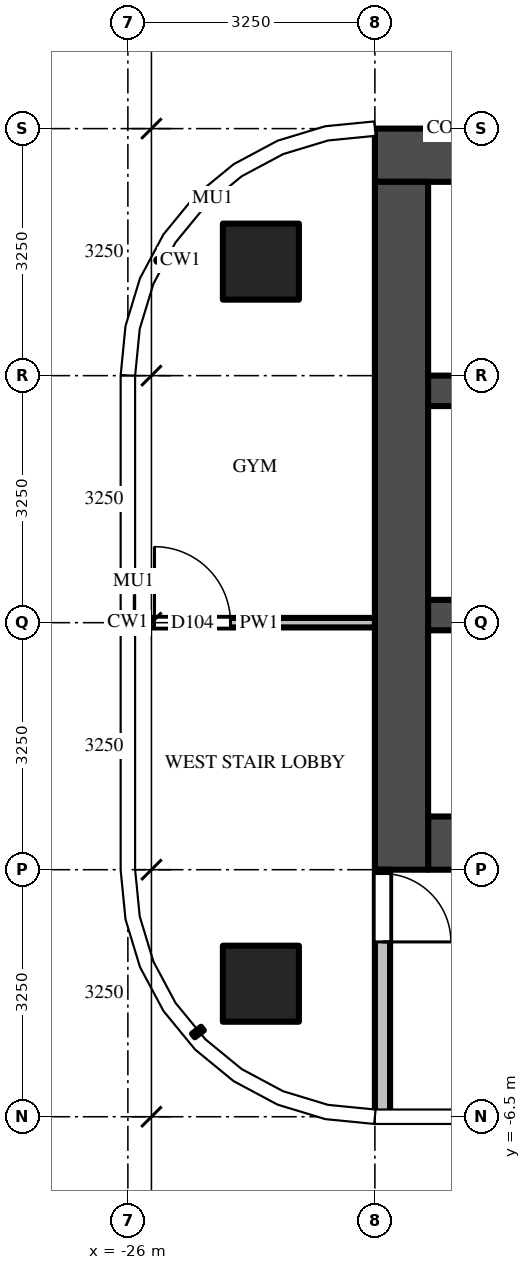
"""IFC4 building model, lengths in metres.
Left out: names, types, materials, properties, quantities, classifications, styles, units other than length and angle.
Written with IfcOpenShell. Run it as: python <this file> out.ifc"""

import sys

from ifc_helpers import new_model, si_unit, direction, frame, frame_2d, origin, origin_2d, place, context, subcontext, project, spatial, rectangle, extrude, source, transform, mapped, element, fill, save


model = new_model("IFC4")
c1 = context("Model", 3, precision=1e-05, world=origin(), true_north=direction((0.0, 1.0)))
c2 = subcontext(c1, "Body", "Model", "MODEL_VIEW")
j1 = project(units=[si_unit("LENGTHUNIT", "METRE"), si_unit("PLANEANGLEUNIT", "RADIAN")], contexts=[c1])
p1 = place(None, origin())
s1 = spatial("IfcSite", under=j1, at=p1, CompositionType="ELEMENT")
p2 = place(p1, origin())
s2 = spatial("IfcBuilding", under=s1, at=p2, CompositionType="ELEMENT")
p3 = place(p2, frame((0.0, 0.0, 298.9)))
s3 = spatial("IfcBuildingStorey", under=s2, at=p3, CompositionType="ELEMENT", Elevation=298.9)
m1 = source(origin(), c2, "Body", "SweptSolid", [
    extrude(rectangle(XDim=1.0, YDim=1.0, at=origin_2d()), origin(), (0.0, 0.0, 1.0), 3.9),
])
for number, where, z_axis, x_axis in (
    (1, (-24.25, -4.75, 0.0), (0.0, 0.0, 1.0), (1.0, 0.0, 0.0)),
    (2, (-24.25, 4.75, 0.0), (0.0, 0.0, 1.0), (1.0, 0.0, 0.0)),
):
    element("IfcColumn", number, at=place(p3, frame(where, z_axis=z_axis, x_axis=x_axis)), inside=s3, PredefinedType="COLUMN", context=c2, shape_type="MappedRepresentation", body=[
        mapped(m1, transform((0.0, 0.0, 0.0))),
    ])
m2 = source(origin(), c2, "Body", "SweptSolid", [
    extrude(rectangle(XDim=16.65, YDim=0.7, at=frame_2d((8.325, 0.0))), origin(), (0.0, 0.0, 1.0), 3.7),
])
p4 = place(p3, frame((-6.1, 6.15, 0.0), z_axis=(0.0, 0.0, 1.0), x_axis=(-1.0, 0.0, 0.0)))
e3 = element("IfcWall", 3, at=p4, inside=s3, PredefinedType="SHEAR", context=c2, shape_type="MappedRepresentation", body=[
    mapped(m2, transform((0.0, 0.0, 0.0))),
])
m3 = source(origin(), c2, "Body", "SweptSolid", [
    extrude(rectangle(XDim=14.85, YDim=0.7, at=frame_2d((7.425, 0.0))), origin(), (0.0, 0.0, 1.0), 3.7),
])
p5 = place(p3, frame((-7.2, -2.9, 0.0), z_axis=(0.0, 0.0, 1.0), x_axis=(-1.0, 0.0, 0.0)))
e4 = element("IfcWall", 4, at=p5, inside=s3, PredefinedType="SHEAR", context=c2, shape_type="MappedRepresentation", body=[
    mapped(m3, transform((0.0, 0.0, 0.0))),
])
m4 = source(origin(), c2, "Body", "SweptSolid", [
    extrude(rectangle(XDim=1.2, YDim=2.1, at=frame_2d((0.6, 1.05))), frame((0.0, 0.36, 0.0), z_axis=(0.0, -1.0, 0.0), x_axis=(1.0, 0.0, 0.0)), (0.0, 0.0, 1.0), 0.72),
])
p6 = place(p5, frame((5.7, 0.0, 0.0)))
e5 = element("IfcOpeningElement", 5, at=p6, cuts=e4, PredefinedType="OPENING", context=c2, shape_type="MappedRepresentation", body=[
    mapped(m4, transform((0.0, 0.0, 0.0))),
])
m5 = source(origin(), c2, "Body", "SweptSolid", [
    extrude(rectangle(XDim=1.3, YDim=2.1, at=frame_2d((0.65, 1.05))), frame((0.0, 0.36, 0.0), z_axis=(0.0, -1.0, 0.0), x_axis=(1.0, 0.0, 0.0)), (0.0, 0.0, 1.0), 0.72),
])
p7 = place(p5, frame((12.2, 0.0, 0.0)))
e6 = element("IfcOpeningElement", 6, at=p7, cuts=e4, PredefinedType="OPENING", context=c2, shape_type="MappedRepresentation", body=[
    mapped(m5, transform((0.0, 0.0, 0.0))),
])
p8 = place(p5, frame((9.85, 0.0, 0.0)))
e7 = element("IfcOpeningElement", 7, at=p8, cuts=e4, PredefinedType="OPENING", context=c2, shape_type="MappedRepresentation", body=[
    mapped(m4, transform((0.0, 0.0, 0.0))),
])
m6 = source(origin(), c2, "Body", "SweptSolid", [
    extrude(rectangle(XDim=1.0, YDim=2.1, at=frame_2d((0.5, 1.05))), frame((0.0, 0.36, 0.0), z_axis=(0.0, -1.0, 0.0), x_axis=(1.0, 0.0, 0.0)), (0.0, 0.0, 1.0), 0.72),
])
p9 = place(p5, frame((7.9, 0.0, 0.0)))
e8 = element("IfcOpeningElement", 8, at=p9, cuts=e4, PredefinedType="OPENING", context=c2, shape_type="MappedRepresentation", body=[
    mapped(m6, transform((0.0, 0.0, 0.0))),
])
m7 = source(origin(), c2, "Body", "SweptSolid", [
    extrude(rectangle(XDim=0.8, YDim=2.1, at=frame_2d((0.4, 1.05))), frame((0.0, 0.36, 0.0), z_axis=(0.0, -1.0, 0.0), x_axis=(1.0, 0.0, 0.0)), (0.0, 0.0, 1.0), 0.72),
])
p10 = place(p5, frame((0.212, 0.0, 0.0)))
e9 = element("IfcOpeningElement", 9, at=p10, cuts=e4, PredefinedType="OPENING", context=c2, shape_type="MappedRepresentation", body=[
    mapped(m7, transform((0.0, 0.0, 0.0))),
])
p11 = place(p5, frame((1.9, 0.0, 0.0)))
e10 = element("IfcOpeningElement", 10, at=p11, cuts=e4, PredefinedType="OPENING", context=c2, shape_type="MappedRepresentation", body=[
    mapped(m6, transform((0.0, 0.0, 0.0))),
])
p12 = place(p5, frame((3.788, 0.0, 0.0)))
e11 = element("IfcOpeningElement", 11, at=p12, cuts=e4, PredefinedType="OPENING", context=c2, shape_type="MappedRepresentation", body=[
    mapped(m7, transform((0.0, 0.0, 0.0))),
])
m8 = source(origin(), c2, "Body", "SweptSolid", [
    extrude(rectangle(XDim=9.05, YDim=0.7, at=frame_2d((4.525, 0.0))), origin(), (0.0, 0.0, 1.0), 3.7),
])
p13 = place(p3, frame((-22.4, 5.8, 0.0), z_axis=(0.0, 0.0, 1.0), x_axis=(0.0, -1.0, 0.0)))
e12 = element("IfcWall", 12, at=p13, inside=s3, PredefinedType="SHEAR", context=c2, shape_type="MappedRepresentation", body=[
    mapped(m8, transform((0.0, 0.0, 0.0))),
])
m9 = source(origin(), c2, "Body", "SweptSolid", [
    extrude(rectangle(XDim=14.85, YDim=0.4, at=frame_2d((7.425, 0.0))), origin(), (0.0, 0.0, 1.0), 3.7),
])
p14 = place(p3, frame((-7.2, 0.1, 0.0), z_axis=(0.0, 0.0, 1.0), x_axis=(-1.0, 0.0, 0.0)))
e13 = element("IfcWall", 13, at=p14, inside=s3, PredefinedType="SHEAR", context=c2, shape_type="MappedRepresentation", body=[
    mapped(m9, transform((0.0, 0.0, 0.0))),
])
m10 = source(origin(), c2, "Body", "SweptSolid", [
    extrude(rectangle(XDim=1.0, YDim=2.1, at=frame_2d((0.5, 1.05))), frame((0.0, 0.21, 0.0), z_axis=(0.0, -1.0, 0.0), x_axis=(1.0, 0.0, 0.0)), (0.0, 0.0, 1.0), 0.42),
])
p15 = place(p14, frame((7.9, 0.0, 0.0)))
e14 = element("IfcOpeningElement", 14, at=p15, cuts=e13, PredefinedType="OPENING", context=c2, shape_type="MappedRepresentation", body=[
    mapped(m10, transform((0.0, 0.0, 0.0))),
])
m11 = source(origin(), c2, "Body", "SweptSolid", [
    extrude(rectangle(XDim=5.7, YDim=0.4, at=frame_2d((2.85, 0.0))), origin(), (0.0, 0.0, 1.0), 3.7),
])
p16 = place(p3, frame((-16.35, 3.05, 0.0), z_axis=(0.0, 0.0, 1.0), x_axis=(-1.0, 0.0, 0.0)))
e15 = element("IfcWall", 15, at=p16, inside=s3, PredefinedType="SHEAR", context=c2, shape_type="MappedRepresentation", body=[
    mapped(m11, transform((0.0, 0.0, 0.0))),
])
m12 = source(origin(), c2, "Body", "SweptSolid", [
    extrude(rectangle(XDim=3.25, YDim=0.2, at=frame_2d((1.625, 0.0))), origin(), (0.0, 0.0, 1.0), 3.7),
])
p17 = place(p3, frame((-22.65, -3.25, 0.0), z_axis=(0.0, 0.0, 1.0), x_axis=(0.0, -1.0, 0.0)))
e16 = element("IfcWall", 16, at=p17, inside=s3, PredefinedType="PARTITIONING", context=c2, shape_type="MappedRepresentation", body=[
    mapped(m12, transform((0.0, 0.0, 0.0))),
])
m13 = source(origin(), c2, "Body", "SweptSolid", [
    extrude(rectangle(XDim=0.9, YDim=2.1, at=frame_2d((0.45, 1.05))), frame((0.0, 0.11, 0.0), z_axis=(0.0, -1.0, 0.0), x_axis=(1.0, 0.0, 0.0)), (0.0, 0.0, 1.0), 0.22),
])
p18 = place(p17, frame((0.05, 0.0, 0.0)))
e17 = element("IfcOpeningElement", 17, at=p18, cuts=e16, PredefinedType="OPENING", context=c2, shape_type="MappedRepresentation", body=[
    mapped(m13, transform((0.0, 0.0, 0.0))),
])
m14 = source(origin(), c2, "Body", "SweptSolid", [
    extrude(rectangle(XDim=3.05, YDim=0.125, at=frame_2d((1.525, 0.0))), origin(), (0.0, 0.0, 1.0), 2.78),
])
p19 = place(p3, frame((-25.8, 0.0, 0.0), z_axis=(0.0, 0.0, 1.0), x_axis=(1.0, 0.0, 0.0)))
e18 = element("IfcWall", 18, at=p19, inside=s3, PredefinedType="PARTITIONING", context=c2, shape_type="MappedRepresentation", body=[
    mapped(m14, transform((0.0, 0.0, 0.0))),
])
m15 = source(origin(), c2, "Body", "SweptSolid", [
    extrude(rectangle(XDim=1.0, YDim=2.1, at=frame_2d((0.5, 1.05))), frame((0.0, 0.073, 0.0), z_axis=(0.0, -1.0, 0.0), x_axis=(1.0, 0.0, 0.0)), (0.0, 0.0, 1.0), 0.145),
])
p20 = place(p19, frame((0.15, 0.0, 0.0)))
e19 = element("IfcOpeningElement", 19, at=p20, cuts=e18, PredefinedType="OPENING", context=c2, shape_type="MappedRepresentation", body=[
    mapped(m15, transform((0.0, 0.0, 0.0))),
])
m16 = source(origin(), c2, "Body", "SweptSolid", [
    extrude(rectangle(XDim=0.9, YDim=2.1, at=frame_2d((0.45, 1.05))), frame((0.0, 0.025, 0.0), z_axis=(0.0, -1.0, 0.0), x_axis=(1.0, 0.0, 0.0)), (0.0, 0.0, 1.0), 0.05),
])
p21 = place(p18, origin())
e20 = element("IfcDoor", 20, at=p21, inside=s3, OperationType="SINGLE_SWING_RIGHT", PredefinedType="DOOR", context=c2, shape_type="MappedRepresentation", body=[
    mapped(m16, transform((0.0, 0.0, 0.0))),
])
fill(e17, e20)
m17 = source(origin(), c2, "Body", "SweptSolid", [
    extrude(rectangle(XDim=1.0, YDim=2.1, at=frame_2d((0.5, 1.05))), frame((0.0, 0.025, 0.0), z_axis=(0.0, -1.0, 0.0), x_axis=(1.0, 0.0, 0.0)), (0.0, 0.0, 1.0), 0.05),
])
p22 = place(p20, origin())
e21 = element("IfcDoor", 21, at=p22, inside=s3, OperationType="SINGLE_SWING_LEFT", PredefinedType="DOOR", context=c2, shape_type="MappedRepresentation", body=[
    mapped(m17, transform((0.0, 0.0, 0.0))),
])
fill(e19, e21)
save(model, sys.argv[1])
